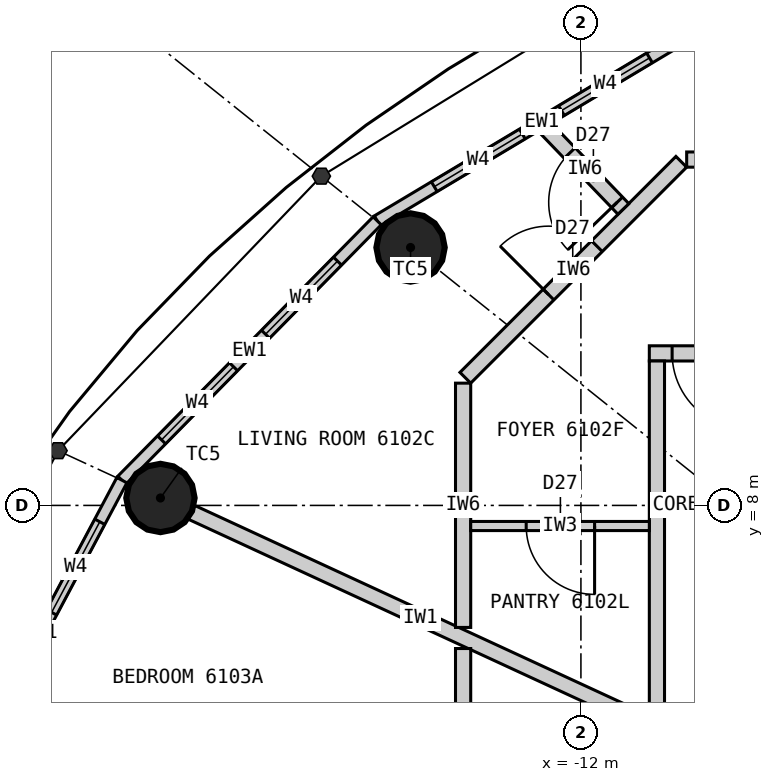
"""IFC4 building model, lengths in metres.
Left out: names, types, materials, properties, quantities, classifications, styles, units other than length and angle.
Written with IfcOpenShell. Run it as: python <this file> out.ifc"""

import sys

from ifc_helpers import new_model, si_unit, direction, frame, frame_2d, origin, origin_2d, place, context, subcontext, project, spatial, rectangle, circle, extrude, element, fill, save


model = new_model("IFC4")
c1 = context("Model", 3, precision=1e-05, world=origin(), true_north=direction((0.0, 1.0)))
c2 = subcontext(c1, "Body", "Model", "MODEL_VIEW")
j1 = project(units=[si_unit("LENGTHUNIT", "METRE"), si_unit("PLANEANGLEUNIT", "RADIAN")], contexts=[c1])
p1 = place(None, origin())
s1 = spatial("IfcSite", under=j1, at=p1, CompositionType="ELEMENT")
p2 = place(p1, origin())
s2 = spatial("IfcBuilding", under=s1, at=p2, CompositionType="ELEMENT")
p3 = place(p2, frame((0.0, 0.0, 225.9)))
s3 = spatial("IfcBuildingStorey", under=s2, at=p3, CompositionType="ELEMENT", Elevation=225.9)
for number, where, z_axis, x_axis in (
    (1, (-14.241, 11.393, 0.0), (0.0, 0.0, 1.0), (1.0, 0.0, 0.0)),
    (2, (-17.532, 8.098, 0.0), (0.0, 0.0, 1.0), (1.0, 0.0, 0.0)),
):
    element("IfcColumn", number, at=place(p3, frame(where, z_axis=z_axis, x_axis=x_axis)), inside=s3, PredefinedType="COLUMN", context=c2, shape_type="SweptSolid", body=[
        extrude(circle(Radius=0.45, at=origin_2d()), origin(), (0.0, 0.0, 1.0), 3.3),
    ])
p4 = place(p3, frame((-10.346, 14.336, 0.0), z_axis=(0.0, 0.0, 1.0), x_axis=(-0.85822150553, -0.513279502265, 0.0)))
e3 = element("IfcWall", 3, at=p4, inside=s3, PredefinedType="ELEMENTEDWALL", context=c2, shape_type="SweptSolid", body=[
    extrude(rectangle(XDim=5.05, YDim=0.15, at=frame_2d((2.525, 0.0))), origin(), (0.0, 0.0, 1.0), 3.12),
])
p5 = place(p4, frame((0.875, 0.0, 0.9)))
e4 = element("IfcOpeningElement", 4, at=p5, cuts=e3, PredefinedType="OPENING", context=c2, shape_type="SweptSolid", body=[
    extrude(rectangle(XDim=1.35, YDim=1.9, at=frame_2d((0.675, 0.95))), frame((0.0, 0.085, 0.0), z_axis=(0.0, -1.0, 0.0), x_axis=(1.0, 0.0, 0.0)), (0.0, 0.0, 1.0), 0.17),
])
p6 = place(p4, frame((2.825, 0.0, 0.9)))
e5 = element("IfcOpeningElement", 5, at=p6, cuts=e3, PredefinedType="OPENING", context=c2, shape_type="SweptSolid", body=[
    extrude(rectangle(XDim=1.35, YDim=1.9, at=frame_2d((0.675, 0.95))), frame((0.0, 0.085, 0.0), z_axis=(0.0, -1.0, 0.0), x_axis=(1.0, 0.0, 0.0)), (0.0, 0.0, 1.0), 0.17),
])
p7 = place(p3, frame((-14.68, 11.744, 0.0), z_axis=(0.0, 0.0, 1.0), x_axis=(-0.701527379618, -0.712642501993, 0.0)))
e6 = element("IfcWall", 6, at=p7, inside=s3, PredefinedType="ELEMENTEDWALL", context=c2, shape_type="SweptSolid", body=[
    extrude(rectangle(XDim=4.788, YDim=0.15, at=frame_2d((2.394, 0.0))), origin(), (0.0, 0.0, 1.0), 3.12),
])
p8 = place(p7, frame((0.744, 0.0, 0.9)))
e7 = element("IfcOpeningElement", 7, at=p8, cuts=e6, PredefinedType="OPENING", context=c2, shape_type="SweptSolid", body=[
    extrude(rectangle(XDim=1.35, YDim=1.9, at=frame_2d((0.675, 0.95))), frame((0.0, 0.085, 0.0), z_axis=(0.0, -1.0, 0.0), x_axis=(1.0, 0.0, 0.0)), (0.0, 0.0, 1.0), 0.17),
])
p9 = place(p7, frame((2.694, 0.0, 0.9)))
e8 = element("IfcOpeningElement", 8, at=p9, cuts=e6, PredefinedType="OPENING", context=c2, shape_type="SweptSolid", body=[
    extrude(rectangle(XDim=1.35, YDim=1.9, at=frame_2d((0.675, 0.95))), frame((0.0, 0.085, 0.0), z_axis=(0.0, -1.0, 0.0), x_axis=(1.0, 0.0, 0.0)), (0.0, 0.0, 1.0), 0.17),
])
p10 = place(p3, frame((-18.04, 8.332, 0.0), z_axis=(0.0, 0.0, 1.0), x_axis=(-0.469256152955, -0.883062094597, 0.0)))
e9 = element("IfcWall", 9, at=p10, inside=s3, PredefinedType="ELEMENTEDWALL", context=c2, shape_type="SweptSolid", body=[
    extrude(rectangle(XDim=4.539, YDim=0.15, at=frame_2d((2.27, 0.0))), origin(), (0.0, 0.0, 1.0), 3.12),
])
p11 = place(p10, frame((0.62, 0.0, 0.9)))
e10 = element("IfcOpeningElement", 10, at=p11, cuts=e9, PredefinedType="OPENING", context=c2, shape_type="SweptSolid", body=[
    extrude(rectangle(XDim=1.35, YDim=1.9, at=frame_2d((0.675, 0.95))), frame((0.0, 0.085, 0.0), z_axis=(0.0, -1.0, 0.0), x_axis=(1.0, 0.0, 0.0)), (0.0, 0.0, 1.0), 0.17),
])
p12 = place(p10, frame((2.57, 0.0, 0.9)))
e11 = element("IfcOpeningElement", 11, at=p12, cuts=e9, PredefinedType="OPENING", context=c2, shape_type="SweptSolid", body=[
    extrude(rectangle(XDim=1.35, YDim=1.9, at=frame_2d((0.675, 0.95))), frame((0.0, 0.085, 0.0), z_axis=(0.0, -1.0, 0.0), x_axis=(1.0, 0.0, 0.0)), (0.0, 0.0, 1.0), 0.17),
])
p13 = place(p3, frame((-11.1, 10.0, 0.0), z_axis=(0.0, 0.0, 1.0), x_axis=(1.0, 0.0, 0.0)))
e12 = element("IfcWall", 12, at=p13, inside=s3, PredefinedType="PARTITIONING", context=c2, shape_type="SweptSolid", body=[
    extrude(rectangle(XDim=22.2, YDim=0.2, at=frame_2d((11.1, 0.0))), origin(), (0.0, 0.0, 1.0), 3.12),
])
p14 = place(p13, frame((0.3, 0.0, 0.0)))
e13 = element("IfcOpeningElement", 13, at=p14, cuts=e12, PredefinedType="OPENING", context=c2, shape_type="SweptSolid", body=[
    extrude(rectangle(XDim=1.0, YDim=2.2, at=frame_2d((0.5, 1.1))), frame((0.0, 0.11, 0.0), z_axis=(0.0, -1.0, 0.0), x_axis=(1.0, 0.0, 0.0)), (0.0, 0.0, 1.0), 0.22),
])
p15 = place(p3, frame((-11.0, 9.9, 0.0), z_axis=(0.0, 0.0, 1.0), x_axis=(0.0, -1.0, 0.0)))
e14 = element("IfcWall", 14, at=p15, inside=s3, PredefinedType="PARTITIONING", context=c2, shape_type="SweptSolid", body=[
    extrude(rectangle(XDim=19.8, YDim=0.2, at=frame_2d((9.9, 0.0))), origin(), (0.0, 0.0, 1.0), 3.12),
])
p16 = place(p15, frame((9.385, 0.0, 0.0)))
e15 = element("IfcOpeningElement", 15, at=p16, cuts=e14, PredefinedType="OPENING", context=c2, shape_type="SweptSolid", body=[
    extrude(rectangle(XDim=1.0, YDim=2.2, at=frame_2d((0.5, 1.1))), frame((0.0, 0.11, 0.0), z_axis=(0.0, -1.0, 0.0), x_axis=(1.0, 0.0, 0.0)), (0.0, 0.0, 1.0), 0.22),
])
p17 = place(p15, frame((18.658, 0.0, 0.0)))
e16 = element("IfcOpeningElement", 16, at=p17, cuts=e14, PredefinedType="OPENING", context=c2, shape_type="SweptSolid", body=[
    extrude(rectangle(XDim=1.0, YDim=2.2, at=frame_2d((0.5, 1.1))), frame((0.0, 0.11, 0.0), z_axis=(0.0, -1.0, 0.0), x_axis=(1.0, 0.0, 0.0)), (0.0, 0.0, 1.0), 0.22),
])
p18 = place(p3, frame((-11.1, 5.127, 0.0), z_axis=(0.0, 0.0, 1.0), x_axis=(-0.907840886552, 0.419314827672, 0.0)))
e17 = element("IfcWall", 17, at=p18, inside=s3, PredefinedType="PARTITIONING", context=c2, shape_type="SweptSolid", body=[
    extrude(rectangle(XDim=6.635, YDim=0.2, at=frame_2d((3.318, 0.0))), origin(), (0.0, 0.0, 1.0), 2.32),
])
p19 = place(p3, frame((-0.101, 12.55, 0.0), z_axis=(0.0, 0.0, 1.0), x_axis=(-1.0, 0.0, 0.0)))
e18 = element("IfcWall", 18, at=p19, inside=s3, PredefinedType="PARTITIONING", context=c2, shape_type="SweptSolid", body=[
    extrude(rectangle(XDim=10.508, YDim=0.2, at=frame_2d((5.254, 0.0))), origin(), (0.0, 0.0, 1.0), 3.12),
])
p20 = place(p19, frame((2.675, 0.0, 0.0)))
e19 = element("IfcOpeningElement", 19, at=p20, cuts=e18, PredefinedType="OPENING", context=c2, shape_type="SweptSolid", body=[
    extrude(rectangle(XDim=0.8, YDim=2.1, at=frame_2d((0.4, 1.05))), frame((0.0, 0.11, 0.0), z_axis=(0.0, -1.0, 0.0), x_axis=(1.0, 0.0, 0.0)), (0.0, 0.0, 1.0), 0.22),
])
p21 = place(p19, frame((4.82, 0.0, 0.0)))
e20 = element("IfcOpeningElement", 20, at=p21, cuts=e18, PredefinedType="OPENING", context=c2, shape_type="SweptSolid", body=[
    extrude(rectangle(XDim=0.9, YDim=2.1, at=frame_2d((0.45, 1.05))), frame((0.0, 0.11, 0.0), z_axis=(0.0, -1.0, 0.0), x_axis=(1.0, 0.0, 0.0)), (0.0, 0.0, 1.0), 0.22),
])
p22 = place(p3, frame((-10.679, 12.521, 0.0), z_axis=(0.0, 0.0, 1.0), x_axis=(-0.707106781187, -0.707106781187, 0.0)))
e21 = element("IfcWall", 21, at=p22, inside=s3, PredefinedType="PARTITIONING", context=c2, shape_type="SweptSolid", body=[
    extrude(rectangle(XDim=4.019, YDim=0.2, at=frame_2d((2.009, 0.0))), origin(), (0.0, 0.0, 1.0), 3.12),
])
p23 = place(p22, frame((1.57, 0.0, 0.0)))
e22 = element("IfcOpeningElement", 22, at=p23, cuts=e21, PredefinedType="OPENING", context=c2, shape_type="SweptSolid", body=[
    extrude(rectangle(XDim=0.9, YDim=2.1, at=frame_2d((0.45, 1.05))), frame((0.0, 0.11, 0.0), z_axis=(0.0, -1.0, 0.0), x_axis=(1.0, 0.0, 0.0)), (0.0, 0.0, 1.0), 0.22),
])
p24 = place(p3, frame((-13.55, 9.609, 0.0), z_axis=(0.0, 0.0, 1.0), x_axis=(0.0, -1.0, 0.0)))
e23 = element("IfcWall", 23, at=p24, inside=s3, PredefinedType="PARTITIONING", context=c2, shape_type="SweptSolid", body=[
    extrude(rectangle(XDim=3.214, YDim=0.2, at=frame_2d((1.607, 0.0))), origin(), (0.0, 0.0, 1.0), 3.12),
])
p25 = place(p3, frame((-11.441, 11.9, 0.0), z_axis=(0.0, 0.0, 1.0), x_axis=(-0.692958717259, 0.720977264672, 0.0)))
e24 = element("IfcWall", 24, at=p25, inside=s3, PredefinedType="PARTITIONING", context=c2, shape_type="SweptSolid", body=[
    extrude(rectangle(XDim=1.464, YDim=0.2, at=frame_2d((0.732, 0.0))), origin(), (0.0, 0.0, 1.0), 3.12),
])
p26 = place(p25, frame((0.12, 0.0, 0.0)))
e25 = element("IfcOpeningElement", 25, at=p26, cuts=e24, PredefinedType="OPENING", context=c2, shape_type="SweptSolid", body=[
    extrude(rectangle(XDim=0.9, YDim=2.1, at=frame_2d((0.45, 1.05))), frame((0.0, 0.11, 0.0), z_axis=(0.0, -1.0, 0.0), x_axis=(1.0, 0.0, 0.0)), (0.0, 0.0, 1.0), 0.22),
])
p27 = place(p3, frame((-11.1, 7.729, 0.0), z_axis=(0.0, 0.0, 1.0), x_axis=(-1.0, 0.0, 0.0)))
e26 = element("IfcWall", 26, at=p27, inside=s3, PredefinedType="PARTITIONING", context=c2, shape_type="SweptSolid", body=[
    extrude(rectangle(XDim=2.35, YDim=0.12, at=frame_2d((1.175, 0.0))), origin(), (0.0, 0.0, 1.0), 3.12),
])
p28 = place(p27, frame((0.72, 0.0, 0.0)))
e27 = element("IfcOpeningElement", 27, at=p28, cuts=e26, PredefinedType="OPENING", context=c2, shape_type="SweptSolid", body=[
    extrude(rectangle(XDim=0.9, YDim=2.1, at=frame_2d((0.45, 1.05))), frame((0.0, 0.07, 0.0), z_axis=(0.0, -1.0, 0.0), x_axis=(1.0, 0.0, 0.0)), (0.0, 0.0, 1.0), 0.14),
])
p29 = place(p3, frame((-13.55, 6.117, 0.0), z_axis=(0.0, 0.0, 1.0), x_axis=(0.0, -1.0, 0.0)))
e28 = element("IfcWall", 28, at=p29, inside=s3, PredefinedType="PARTITIONING", context=c2, shape_type="SweptSolid", body=[
    extrude(rectangle(XDim=12.24, YDim=0.2, at=frame_2d((6.12, 0.0))), origin(), (0.0, 0.0, 1.0), 3.12),
])
p30 = place(p29, frame((2.07, 0.0, 0.0)))
e29 = element("IfcOpeningElement", 29, at=p30, cuts=e28, PredefinedType="OPENING", context=c2, shape_type="SweptSolid", body=[
    extrude(rectangle(XDim=0.8, YDim=2.1, at=frame_2d((0.4, 1.05))), frame((0.0, 0.11, 0.0), z_axis=(0.0, -1.0, 0.0), x_axis=(1.0, 0.0, 0.0)), (0.0, 0.0, 1.0), 0.22),
])
p31 = place(p29, frame((9.37, 0.0, 0.0)))
e30 = element("IfcOpeningElement", 30, at=p31, cuts=e28, PredefinedType="OPENING", context=c2, shape_type="SweptSolid", body=[
    extrude(rectangle(XDim=0.8, YDim=2.1, at=frame_2d((0.4, 1.05))), frame((0.0, 0.11, 0.0), z_axis=(0.0, -1.0, 0.0), x_axis=(1.0, 0.0, 0.0)), (0.0, 0.0, 1.0), 0.22),
])
p32 = place(p29, frame((5.67, 0.0, 0.0)))
e31 = element("IfcOpeningElement", 31, at=p32, cuts=e28, PredefinedType="OPENING", context=c2, shape_type="SweptSolid", body=[
    extrude(rectangle(XDim=0.9, YDim=2.1, at=frame_2d((0.45, 1.05))), frame((0.0, 0.11, 0.0), z_axis=(0.0, -1.0, 0.0), x_axis=(1.0, 0.0, 0.0)), (0.0, 0.0, 1.0), 0.22),
])
p33 = place(p5, origin())
e32 = element("IfcWindow", 32, at=p33, inside=s3, PartitioningType="SINGLE_PANEL", PredefinedType="WINDOW", context=c2, shape_type="SweptSolid", body=[
    extrude(rectangle(XDim=1.35, YDim=1.9, at=frame_2d((0.675, 0.95))), frame((0.0, 0.03, 0.0), z_axis=(0.0, -1.0, 0.0), x_axis=(1.0, 0.0, 0.0)), (0.0, 0.0, 1.0), 0.06),
])
fill(e4, e32)
p34 = place(p6, origin())
e33 = element("IfcWindow", 33, at=p34, inside=s3, PartitioningType="SINGLE_PANEL", PredefinedType="WINDOW", context=c2, shape_type="SweptSolid", body=[
    extrude(rectangle(XDim=1.35, YDim=1.9, at=frame_2d((0.675, 0.95))), frame((0.0, 0.03, 0.0), z_axis=(0.0, -1.0, 0.0), x_axis=(1.0, 0.0, 0.0)), (0.0, 0.0, 1.0), 0.06),
])
fill(e5, e33)
p35 = place(p8, origin())
e34 = element("IfcWindow", 34, at=p35, inside=s3, PartitioningType="SINGLE_PANEL", PredefinedType="WINDOW", context=c2, shape_type="SweptSolid", body=[
    extrude(rectangle(XDim=1.35, YDim=1.9, at=frame_2d((0.675, 0.95))), frame((0.0, 0.03, 0.0), z_axis=(0.0, -1.0, 0.0), x_axis=(1.0, 0.0, 0.0)), (0.0, 0.0, 1.0), 0.06),
])
fill(e7, e34)
p36 = place(p9, origin())
e35 = element("IfcWindow", 35, at=p36, inside=s3, PartitioningType="SINGLE_PANEL", PredefinedType="WINDOW", context=c2, shape_type="SweptSolid", body=[
    extrude(rectangle(XDim=1.35, YDim=1.9, at=frame_2d((0.675, 0.95))), frame((0.0, 0.03, 0.0), z_axis=(0.0, -1.0, 0.0), x_axis=(1.0, 0.0, 0.0)), (0.0, 0.0, 1.0), 0.06),
])
fill(e8, e35)
p37 = place(p11, origin())
e36 = element("IfcWindow", 36, at=p37, inside=s3, PartitioningType="SINGLE_PANEL", PredefinedType="WINDOW", context=c2, shape_type="SweptSolid", body=[
    extrude(rectangle(XDim=1.35, YDim=1.9, at=frame_2d((0.675, 0.95))), frame((0.0, 0.03, 0.0), z_axis=(0.0, -1.0, 0.0), x_axis=(1.0, 0.0, 0.0)), (0.0, 0.0, 1.0), 0.06),
])
fill(e10, e36)
p38 = place(p14, origin())
e37 = element("IfcDoor", 37, at=p38, inside=s3, OperationType="SINGLE_SWING_RIGHT", PredefinedType="DOOR", context=c2, shape_type="SweptSolid", body=[
    extrude(rectangle(XDim=1.0, YDim=2.2, at=frame_2d((0.5, 1.1))), frame((0.0, 0.025, 0.0), z_axis=(0.0, -1.0, 0.0), x_axis=(1.0, 0.0, 0.0)), (0.0, 0.0, 1.0), 0.05),
])
fill(e13, e37)
p39 = place(p28, origin())
e38 = element("IfcDoor", 38, at=p39, inside=s3, OperationType="SINGLE_SWING_LEFT", PredefinedType="DOOR", context=c2, shape_type="SweptSolid", body=[
    extrude(rectangle(XDim=0.9, YDim=2.1, at=frame_2d((0.45, 1.05))), frame((0.0, 0.025, 0.0), z_axis=(0.0, -1.0, 0.0), x_axis=(1.0, 0.0, 0.0)), (0.0, 0.0, 1.0), 0.05),
])
fill(e27, e38)
p40 = place(p23, origin())
e39 = element("IfcDoor", 39, at=p40, inside=s3, OperationType="SINGLE_SWING_RIGHT", PredefinedType="DOOR", context=c2, shape_type="SweptSolid", body=[
    extrude(rectangle(XDim=0.9, YDim=2.1, at=frame_2d((0.45, 1.05))), frame((0.0, 0.025, 0.0), z_axis=(0.0, -1.0, 0.0), x_axis=(1.0, 0.0, 0.0)), (0.0, 0.0, 1.0), 0.05),
])
fill(e22, e39)
p41 = place(p26, origin())
e40 = element("IfcDoor", 40, at=p41, inside=s3, OperationType="SINGLE_SWING_LEFT", PredefinedType="DOOR", context=c2, shape_type="SweptSolid", body=[
    extrude(rectangle(XDim=0.9, YDim=2.1, at=frame_2d((0.45, 1.05))), frame((0.0, 0.025, 0.0), z_axis=(0.0, -1.0, 0.0), x_axis=(1.0, 0.0, 0.0)), (0.0, 0.0, 1.0), 0.05),
])
fill(e25, e40)
save(model, sys.argv[1])
